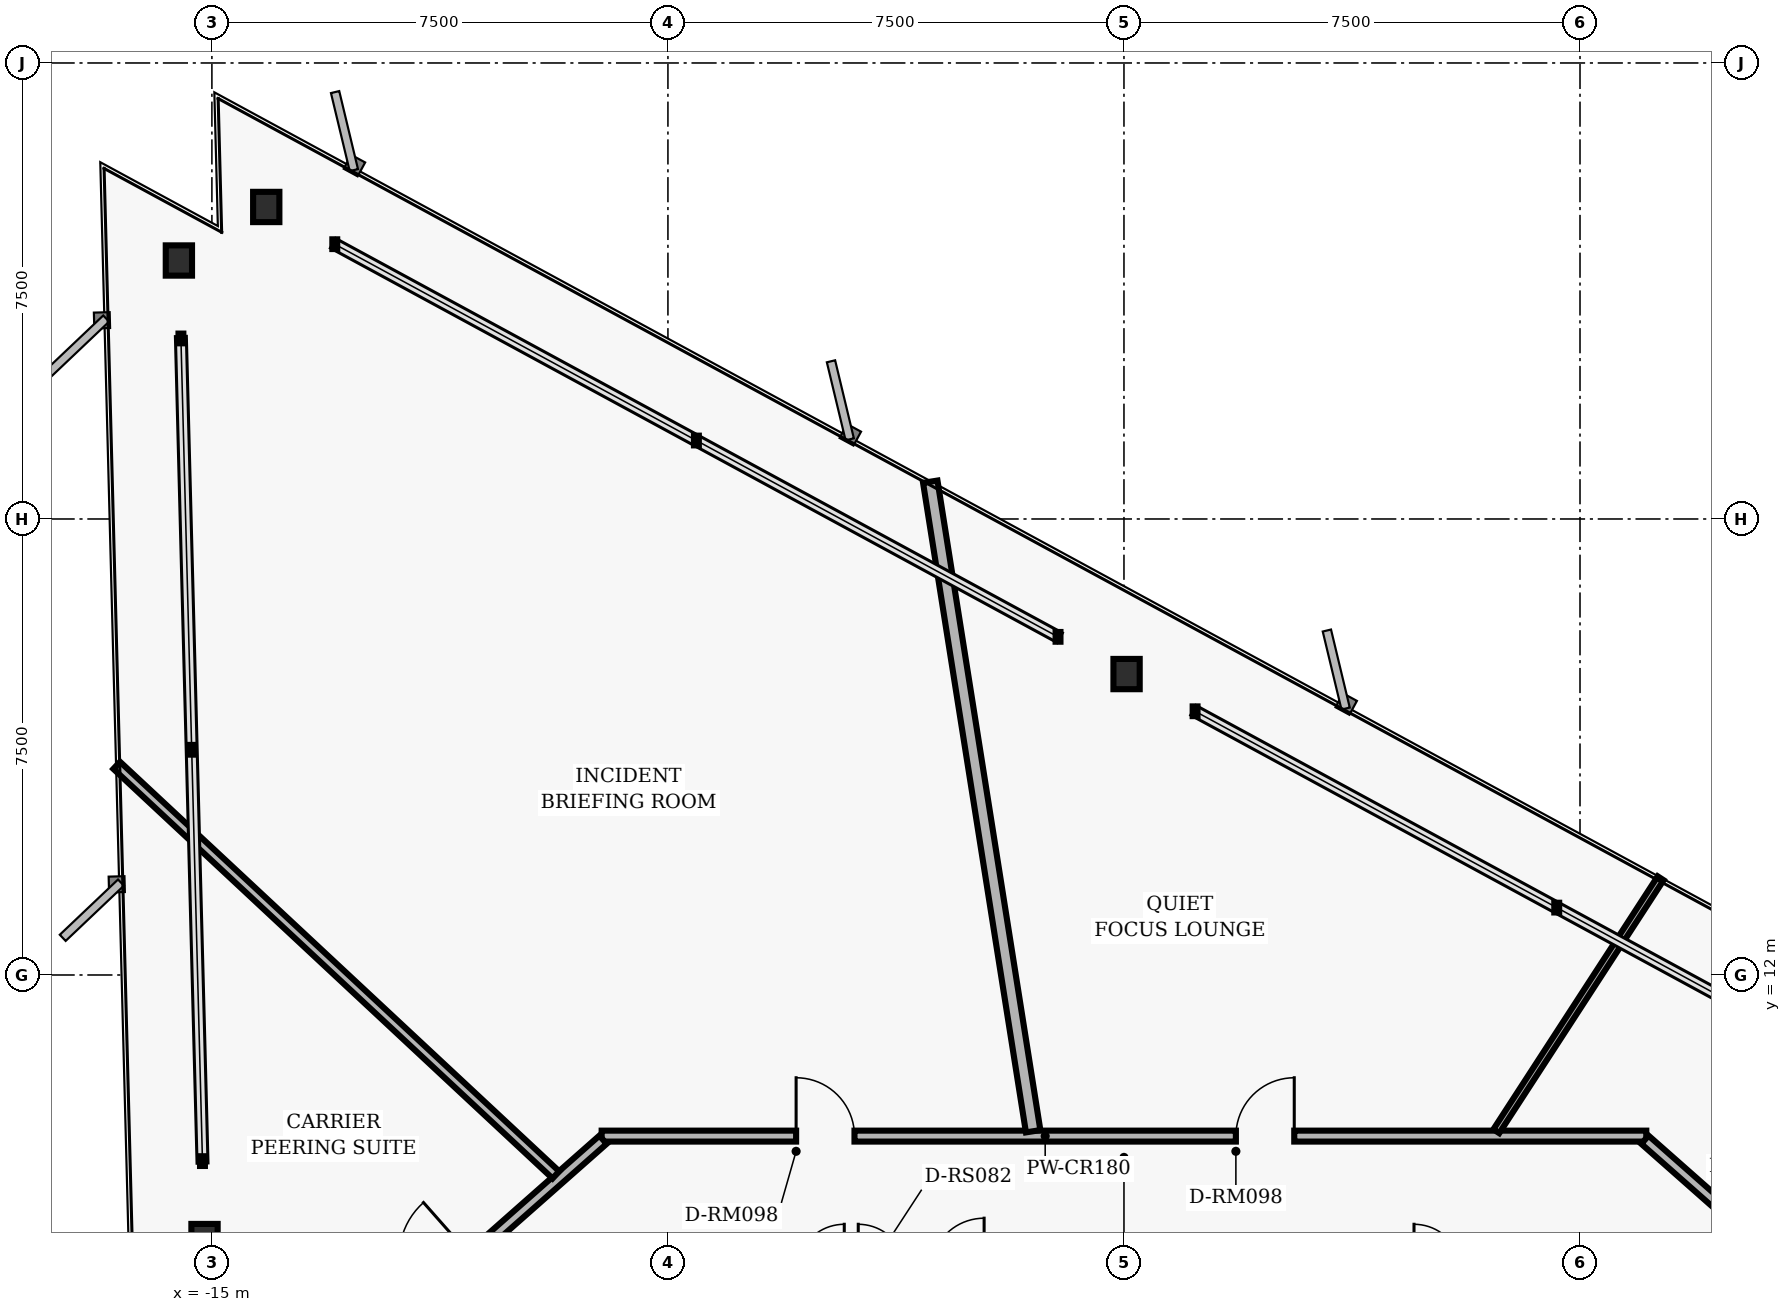
"""IFC4 building model, lengths in metres.
Left out: names, types, materials, properties, quantities, classifications, styles, units other than length and angle.
Written with IfcOpenShell. Run it as: python <this file> out.ifc"""

import sys

from ifc_helpers import new_model, si_unit, direction, frame, frame_2d, origin, origin_2d, place, context, subcontext, project, spatial, rectangle, i_section, extrude, element, fill, save


model = new_model("IFC4")
c1 = context("Model", 3, precision=1e-05, world=origin(), true_north=direction((0.0, 1.0)))
c2 = subcontext(c1, "Body", "Model", "MODEL_VIEW")
j1 = project(units=[si_unit("LENGTHUNIT", "METRE"), si_unit("PLANEANGLEUNIT", "RADIAN")], contexts=[c1])
p1 = place(None, origin())
s1 = spatial("IfcSite", under=j1, at=p1, CompositionType="ELEMENT")
p2 = place(p1, origin())
s2 = spatial("IfcBuilding", under=s1, at=p2, CompositionType="ELEMENT")
p3 = place(p2, frame((0.0, 0.0, 28.96)))
s3 = spatial("IfcBuildingStorey", under=s2, at=p3, CompositionType="ELEMENT", Elevation=28.96)
for number, where, z_axis, x_axis in (
    (1, (0.043, 16.949, 0.0), (0.0, 0.0, 1.0), (1.0, 0.0, 0.0)),
    (2, (-14.106, 24.632, 0.0), (0.0, 0.0, 1.0), (1.0, 0.0, 0.0)),
    (3, (-15.543, 23.751, 0.0), (0.0, 0.0, 1.0), (1.0, 0.0, 0.0)),
    (4, (-15.121, 7.657, 0.0), (0.0, 0.0, 1.0), (1.0, 0.0, 0.0)),
):
    element("IfcColumn", number, at=place(p3, frame(where, z_axis=z_axis, x_axis=x_axis)), inside=s3, PredefinedType="COLUMN", context=c2, shape_type="SweptSolid", body=[
        extrude(i_section(OverallWidth=0.432, OverallDepth=0.498, WebThickness=0.056, FlangeThickness=0.089, FilletRadius=0.025, at=origin_2d()), origin(), (0.0, 0.0, 1.0), 3.36),
    ])
p4 = place(p3, frame((-8.59, 9.35, 0.0), z_axis=(0.0, 0.0, 1.0), x_axis=(1.0, 0.0, 0.0)))
e5 = element("IfcWall", 5, at=p4, inside=s3, PredefinedType="PARTITIONING", context=c2, shape_type="SweptSolid", body=[
    extrude(rectangle(XDim=17.18, YDim=0.18, at=frame_2d((8.59, 0.0))), origin(), (0.0, 0.0, 1.0), 2.587),
])
p5 = place(p4, frame((10.43, 0.0, 0.0)))
e6 = element("IfcOpeningElement", 6, at=p5, cuts=e5, PredefinedType="OPENING", context=c2, shape_type="SweptSolid", body=[
    extrude(rectangle(XDim=0.96, YDim=2.02, at=frame_2d((0.48, 1.01))), frame((0.0, 0.1, 0.0), z_axis=(0.0, -1.0, 0.0), x_axis=(1.0, 0.0, 0.0)), (0.0, 0.0, 1.0), 0.2),
])
p6 = place(p4, frame((3.198, 0.0, 0.0)))
e7 = element("IfcOpeningElement", 7, at=p6, cuts=e5, PredefinedType="OPENING", context=c2, shape_type="SweptSolid", body=[
    extrude(rectangle(XDim=0.96, YDim=2.02, at=frame_2d((0.48, 1.01))), frame((0.0, 0.1, 0.0), z_axis=(0.0, -1.0, 0.0), x_axis=(1.0, 0.0, 0.0)), (0.0, 0.0, 1.0), 0.2),
])
p7 = place(p3, frame((8.567, 9.29, 0.0), z_axis=(0.0, 0.0, 1.0), x_axis=(0.749626463267, -0.66186113768, 0.0)))
e8 = element("IfcWall", 8, at=p7, inside=s3, PredefinedType="PARTITIONING", context=c2, shape_type="SweptSolid", body=[
    extrude(rectangle(XDim=6.27, YDim=0.18, at=frame_2d((3.135, 0.0))), origin(), (0.0, 0.0, 1.0), 2.587),
])
p8 = place(p7, frame((2.655, 0.0, 0.0)))
e9 = element("IfcOpeningElement", 9, at=p8, cuts=e8, PredefinedType="OPENING", context=c2, shape_type="SweptSolid", body=[
    extrude(rectangle(XDim=0.96, YDim=2.02, at=frame_2d((0.48, 1.01))), frame((0.0, 0.1, 0.0), z_axis=(0.0, -1.0, 0.0), x_axis=(1.0, 0.0, 0.0)), (0.0, 0.0, 1.0), 0.2),
])
p9 = place(p3, frame((-13.268, 5.14, 0.0), z_axis=(0.0, 0.0, 1.0), x_axis=(0.749626463267, 0.66186113768, 0.0)))
e10 = element("IfcWall", 10, at=p9, inside=s3, PredefinedType="PARTITIONING", context=c2, shape_type="SweptSolid", body=[
    extrude(rectangle(XDim=6.27, YDim=0.18, at=frame_2d((3.135, 0.0))), origin(), (0.0, 0.0, 1.0), 3.073),
])
p10 = place(p9, frame((2.193, 0.0, 0.0)))
e11 = element("IfcOpeningElement", 11, at=p10, cuts=e10, PredefinedType="OPENING", context=c2, shape_type="SweptSolid", body=[
    extrude(rectangle(XDim=1.18, YDim=2.02, at=frame_2d((0.59, 1.01))), frame((0.0, 0.1, 0.0), z_axis=(0.0, -1.0, 0.0), x_axis=(1.0, 0.0, 0.0)), (0.0, 0.0, 1.0), 0.2),
])
p11 = place(p3, frame((6.124, 9.43, 0.0), z_axis=(0.0, 0.0, 1.0), x_axis=(0.544668366902, 0.838651518866, 0.0)))
e12 = element("IfcWall", 12, at=p11, inside=s3, PredefinedType="MOVABLE", context=c2, shape_type="SweptSolid", body=[
    extrude(rectangle(XDim=4.962, YDim=0.115, at=frame_2d((2.481, 0.0))), origin(), (0.0, 0.0, 1.0), 3.073),
])
p12 = place(p3, frame((-1.494, 9.43, 0.0), z_axis=(0.0, 0.0, 1.0), x_axis=(-0.156418067091, 0.987690937636, 0.0)))
e13 = element("IfcWall", 13, at=p12, inside=s3, PredefinedType="PARTITIONING", context=c2, shape_type="SweptSolid", body=[
    extrude(rectangle(XDim=10.816, YDim=0.24, at=frame_2d((5.408, 0.0))), origin(), (0.0, 0.0, 1.0), 3.073),
])
p13 = place(p3, frame((-9.343, 8.712, 0.0), z_axis=(0.0, 0.0, 1.0), x_axis=(-0.731347028882, 0.682005515627, 0.0)))
e14 = element("IfcWall", 14, at=p13, inside=s3, PredefinedType="PARTITIONING", context=c2, shape_type="SweptSolid", body=[
    extrude(rectangle(XDim=9.876, YDim=0.16, at=frame_2d((4.938, 0.0))), origin(), (0.0, 0.0, 1.0), 3.073),
])
p14 = place(p5, origin())
e15 = element("IfcDoor", 15, at=p14, inside=s3, OperationType="SINGLE_SWING_RIGHT", PredefinedType="DOOR", context=c2, shape_type="SweptSolid", body=[
    extrude(rectangle(XDim=0.96, YDim=2.02, at=frame_2d((0.48, 1.01))), frame((0.0, 0.025, 0.0), z_axis=(0.0, -1.0, 0.0), x_axis=(1.0, 0.0, 0.0)), (0.0, 0.0, 1.0), 0.05),
])
fill(e6, e15)
p15 = place(p6, origin())
e16 = element("IfcDoor", 16, at=p15, inside=s3, OperationType="SINGLE_SWING_LEFT", PredefinedType="DOOR", context=c2, shape_type="SweptSolid", body=[
    extrude(rectangle(XDim=0.96, YDim=2.02, at=frame_2d((0.48, 1.01))), frame((0.0, 0.025, 0.0), z_axis=(0.0, -1.0, 0.0), x_axis=(1.0, 0.0, 0.0)), (0.0, 0.0, 1.0), 0.05),
])
fill(e7, e16)
save(model, sys.argv[1])
